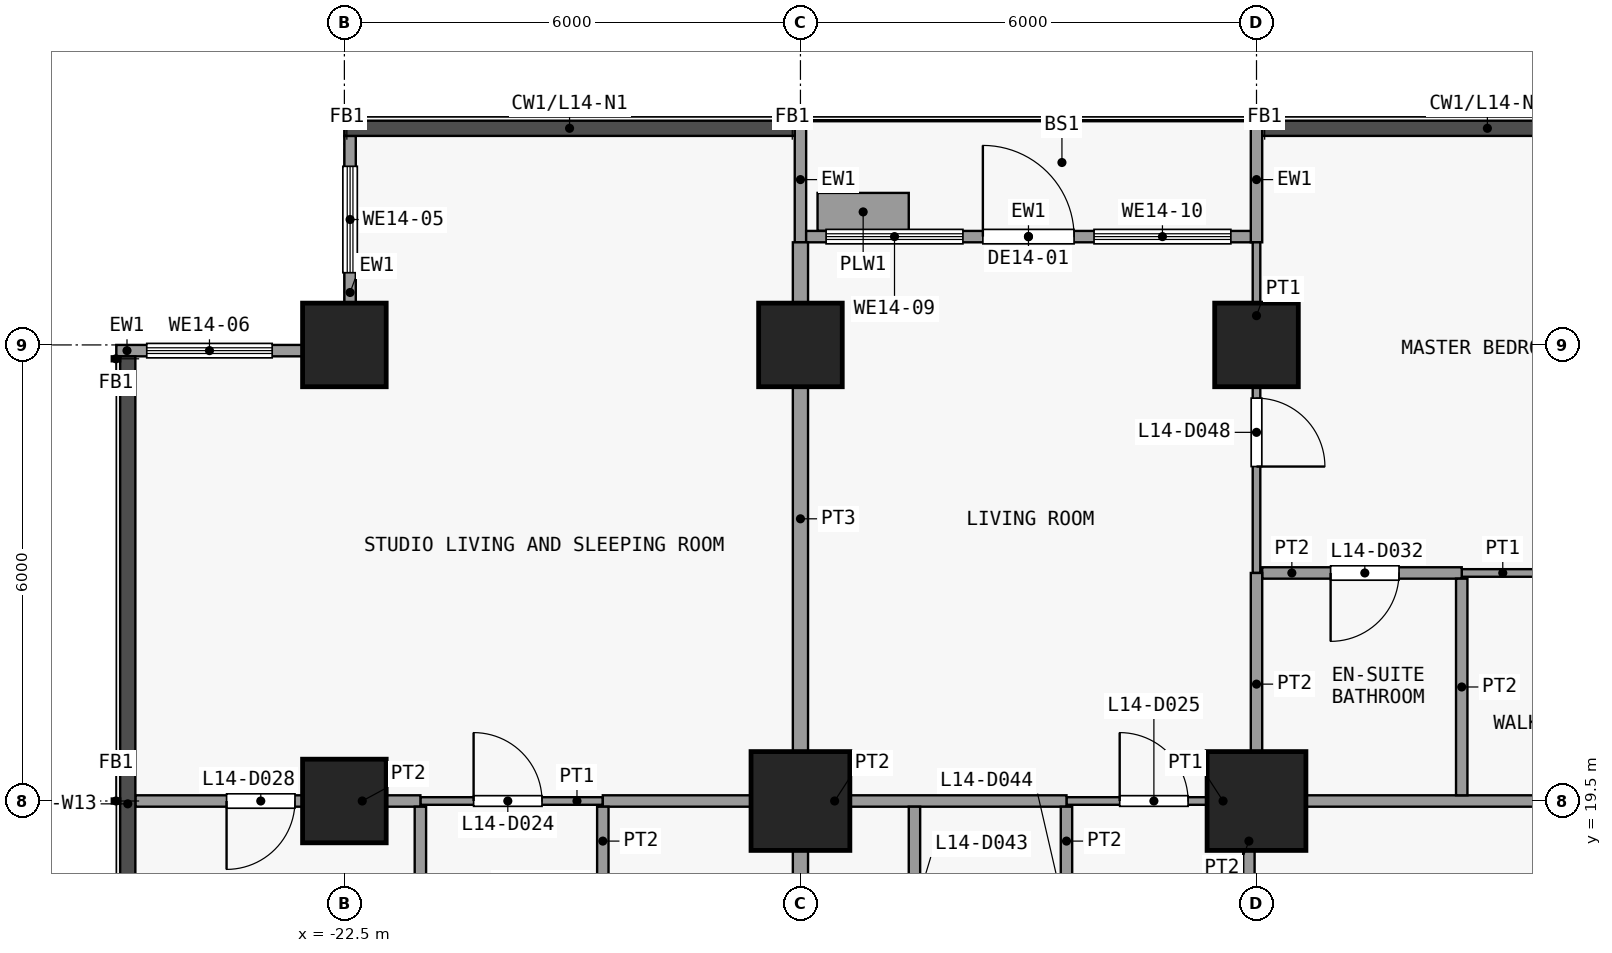
"""IFC4 building model, lengths in metres.
Left out: names, types, materials, properties, quantities, classifications, styles, units other than length and angle.
Written with IfcOpenShell. Run it as: python <this file> out.ifc"""

import sys

from ifc_helpers import new_model, si_unit, direction, frame, frame_2d, origin, origin_2d, place, context, subcontext, project, spatial, rectangle, extrude, element, fill, save


model = new_model("IFC4")
c1 = context("Model", 3, precision=1e-05, world=origin(), true_north=direction((0.0, 1.0)))
c2 = subcontext(c1, "Body", "Model", "MODEL_VIEW")
j1 = project(units=[si_unit("LENGTHUNIT", "METRE"), si_unit("PLANEANGLEUNIT", "RADIAN")], contexts=[c1])
p1 = place(None, origin())
s1 = spatial("IfcSite", under=j1, at=p1, CompositionType="ELEMENT")
p2 = place(p1, origin())
s2 = spatial("IfcBuilding", under=s1, at=p2, CompositionType="ELEMENT")
p3 = place(p2, frame((0.0, 0.0, 61.3)))
s3 = spatial("IfcBuildingStorey", under=s2, at=p3, CompositionType="ELEMENT", Elevation=61.3)
for number, where, z_axis, x_axis in (
    (1, (-22.5, 19.5, 0.0), (0.0, 0.0, 1.0), (1.0, 0.0, 0.0)),
    (2, (-22.5, 25.5, 0.0), (0.0, 0.0, 1.0), (1.0, 0.0, 0.0)),
):
    element("IfcColumn", number, at=place(p3, frame(where, z_axis=z_axis, x_axis=x_axis)), inside=s3, PredefinedType="COLUMN", context=c2, shape_type="SweptSolid", body=[
        extrude(rectangle(XDim=1.1, YDim=1.1, at=origin_2d()), origin(), (0.0, 0.0, 1.0), 3.6),
    ])
p4 = place(p3, frame((-16.5, 19.5, 0.0), z_axis=(0.0, 0.0, 1.0), x_axis=(1.0, 0.0, 0.0)))
e3 = element("IfcColumn", 3, at=p4, inside=s3, PredefinedType="COLUMN", context=c2, shape_type="SweptSolid", body=[
    extrude(rectangle(XDim=1.3, YDim=1.3, at=origin_2d()), origin(), (0.0, 0.0, 1.0), 3.6),
])
p5 = place(p3, frame((-16.5, 25.5, 0.0), z_axis=(0.0, 0.0, 1.0), x_axis=(1.0, 0.0, 0.0)))
e4 = element("IfcColumn", 4, at=p5, inside=s3, PredefinedType="COLUMN", context=c2, shape_type="SweptSolid", body=[
    extrude(rectangle(XDim=1.1, YDim=1.1, at=origin_2d()), origin(), (0.0, 0.0, 1.0), 3.6),
])
p6 = place(p3, frame((-10.5, 19.5, 0.0), z_axis=(0.0, 0.0, 1.0), x_axis=(1.0, 0.0, 0.0)))
e5 = element("IfcColumn", 5, at=p6, inside=s3, PredefinedType="COLUMN", context=c2, shape_type="SweptSolid", body=[
    extrude(rectangle(XDim=1.3, YDim=1.3, at=origin_2d()), origin(), (0.0, 0.0, 1.0), 3.6),
])
p7 = place(p3, frame((-10.5, 25.5, 0.0), z_axis=(0.0, 0.0, 1.0), x_axis=(1.0, 0.0, 0.0)))
e6 = element("IfcColumn", 6, at=p7, inside=s3, PredefinedType="COLUMN", context=c2, shape_type="SweptSolid", body=[
    extrude(rectangle(XDim=1.1, YDim=1.1, at=origin_2d()), origin(), (0.0, 0.0, 1.0), 3.6),
])
p8 = place(p3, frame((-22.425, 26.05, 0.0), z_axis=(0.0, 0.0, 1.0), x_axis=(0.0, 1.0, 0.0)))
e7 = element("IfcWall", 7, at=p8, inside=s3, PredefinedType="SOLIDWALL", context=c2, shape_type="SweptSolid", body=[
    extrude(rectangle(XDim=2.2, YDim=0.15, at=frame_2d((1.1, 0.0))), origin(), (0.0, 0.0, 1.0), 3.3),
])
p9 = place(p8, frame((0.4, 0.0, 0.9)))
e8 = element("IfcOpeningElement", 8, at=p9, cuts=e7, PredefinedType="OPENING", context=c2, shape_type="SweptSolid", body=[
    extrude(rectangle(XDim=1.4, YDim=2.4, at=frame_2d((0.7, 1.2))), frame((0.0, 0.085, 0.0), z_axis=(0.0, -1.0, 0.0), x_axis=(1.0, 0.0, 0.0)), (0.0, 0.0, 1.0), 0.17),
])
p10 = place(p3, frame((-25.5, 25.425, 0.0), z_axis=(0.0, 0.0, 1.0), x_axis=(1.0, 0.0, 0.0)))
e9 = element("IfcWall", 9, at=p10, inside=s3, PredefinedType="SOLIDWALL", context=c2, shape_type="SweptSolid", body=[
    extrude(rectangle(XDim=2.45, YDim=0.15, at=frame_2d((1.225, 0.0))), origin(), (0.0, 0.0, 1.0), 3.3),
])
p11 = place(p10, frame((0.4, 0.0, 0.9)))
e10 = element("IfcOpeningElement", 10, at=p11, cuts=e9, PredefinedType="OPENING", context=c2, shape_type="SweptSolid", body=[
    extrude(rectangle(XDim=1.65, YDim=2.4, at=frame_2d((0.825, 1.2))), frame((0.0, 0.085, 0.0), z_axis=(0.0, -1.0, 0.0), x_axis=(1.0, 0.0, 0.0)), (0.0, 0.0, 1.0), 0.17),
])
for number, where, z_axis, x_axis in (
    (11, (-16.5, 26.85, 0.0), (0.0, 0.0, 1.0), (0.0, 1.0, 0.0)),
    (12, (-10.5, 26.85, 0.0), (0.0, 0.0, 1.0), (0.0, 1.0, 0.0)),
):
    element("IfcWall", number, at=place(p3, frame(where, z_axis=z_axis, x_axis=x_axis)), inside=s3, PredefinedType="SOLIDWALL", context=c2, shape_type="SweptSolid", body=[
        extrude(rectangle(XDim=1.65, YDim=0.15, at=frame_2d((0.825, 0.0))), origin(), (0.0, 0.0, 1.0), 3.3),
    ])
p12 = place(p3, frame((-16.425, 26.925, 0.0), z_axis=(0.0, 0.0, 1.0), x_axis=(1.0, 0.0, 0.0)))
e13 = element("IfcWall", 13, at=p12, inside=s3, PredefinedType="SOLIDWALL", context=c2, shape_type="SweptSolid", body=[
    extrude(rectangle(XDim=5.85, YDim=0.15, at=frame_2d((2.925, 0.0))), origin(), (0.0, 0.0, 1.0), 3.3),
])
p13 = place(p12, frame((2.325, 0.0, 0.0)))
e14 = element("IfcOpeningElement", 14, at=p13, cuts=e13, PredefinedType="OPENING", context=c2, shape_type="SweptSolid", body=[
    extrude(rectangle(XDim=1.2, YDim=2.4, at=frame_2d((0.6, 1.2))), frame((0.0, 0.085, 0.0), z_axis=(0.0, -1.0, 0.0), x_axis=(1.0, 0.0, 0.0)), (0.0, 0.0, 1.0), 0.17),
])
p14 = place(p12, frame((0.262, 0.0, 0.9)))
e15 = element("IfcOpeningElement", 15, at=p14, cuts=e13, PredefinedType="OPENING", context=c2, shape_type="SweptSolid", body=[
    extrude(rectangle(XDim=1.8, YDim=2.1, at=frame_2d((0.9, 1.05))), frame((0.0, 0.085, 0.0), z_axis=(0.0, -1.0, 0.0), x_axis=(1.0, 0.0, 0.0)), (0.0, 0.0, 1.0), 0.17),
])
p15 = place(p12, frame((3.788, 0.0, 0.9)))
e16 = element("IfcOpeningElement", 16, at=p15, cuts=e13, PredefinedType="OPENING", context=c2, shape_type="SweptSolid", body=[
    extrude(rectangle(XDim=1.8, YDim=2.1, at=frame_2d((0.9, 1.05))), frame((0.0, 0.085, 0.0), z_axis=(0.0, -1.0, 0.0), x_axis=(1.0, 0.0, 0.0)), (0.0, 0.0, 1.0), 0.17),
])
p16 = place(p3, frame((-16.275, 27.25, 0.0), z_axis=(0.0, 0.0, 1.0), x_axis=(1.0, 0.0, 0.0)))
e17 = element("IfcWall", 17, at=p16, inside=s3, PredefinedType="USERDEFINED", context=c2, shape_type="SweptSolid", body=[
    extrude(rectangle(XDim=1.2, YDim=0.5, at=frame_2d((0.6, 0.0))), origin(), (0.0, 0.0, 1.0), 0.9),
])
p17 = place(p3, frame((-21.5, 19.5, 0.0), z_axis=(0.0, 0.0, 1.0), x_axis=(1.0, 0.0, 0.0)))
e18 = element("IfcWall", 18, at=p17, inside=s3, PredefinedType="PARTITIONING", context=c2, shape_type="SweptSolid", body=[
    extrude(rectangle(XDim=2.4, YDim=0.1, at=frame_2d((1.2, 0.0))), origin(), (0.0, 0.0, 1.0), 3.3),
])
p18 = place(p17, frame((0.7, 0.0, 0.0)))
e19 = element("IfcOpeningElement", 19, at=p18, cuts=e18, PredefinedType="OPENING", context=c2, shape_type="SweptSolid", body=[
    extrude(rectangle(XDim=0.9, YDim=2.1, at=frame_2d((0.45, 1.05))), frame((0.0, 0.06, 0.0), z_axis=(0.0, -1.0, 0.0), x_axis=(1.0, 0.0, 0.0)), (0.0, 0.0, 1.0), 0.12),
])
p19 = place(p3, frame((-13.0, 19.5, 0.0), z_axis=(0.0, 0.0, 1.0), x_axis=(1.0, 0.0, 0.0)))
e20 = element("IfcWall", 20, at=p19, inside=s3, PredefinedType="PARTITIONING", context=c2, shape_type="SweptSolid", body=[
    extrude(rectangle(XDim=2.4, YDim=0.1, at=frame_2d((1.2, 0.0))), origin(), (0.0, 0.0, 1.0), 3.3),
])
p20 = place(p19, frame((0.7, 0.0, 0.0)))
e21 = element("IfcOpeningElement", 21, at=p20, cuts=e20, PredefinedType="OPENING", context=c2, shape_type="SweptSolid", body=[
    extrude(rectangle(XDim=0.9, YDim=2.1, at=frame_2d((0.45, 1.05))), frame((0.0, 0.06, 0.0), z_axis=(0.0, -1.0, 0.0), x_axis=(1.0, 0.0, 0.0)), (0.0, 0.0, 1.0), 0.12),
])
p21 = place(p3, frame((-25.25, 19.5, 0.0), z_axis=(0.0, 0.0, 1.0), x_axis=(1.0, 0.0, 0.0)))
e22 = element("IfcWall", 22, at=p21, inside=s3, PredefinedType="PARTITIONING", context=c2, shape_type="SweptSolid", body=[
    extrude(rectangle(XDim=3.75, YDim=0.15, at=frame_2d((1.875, 0.0))), origin(), (0.0, 0.0, 1.0), 3.3),
])
p22 = place(p21, frame((1.2, 0.0, 0.0)))
e23 = element("IfcOpeningElement", 23, at=p22, cuts=e22, PredefinedType="OPENING", context=c2, shape_type="SweptSolid", body=[
    extrude(rectangle(XDim=0.9, YDim=2.1, at=frame_2d((0.45, 1.05))), frame((0.0, 0.085, 0.0), z_axis=(0.0, -1.0, 0.0), x_axis=(1.0, 0.0, 0.0)), (0.0, 0.0, 1.0), 0.17),
])
p23 = place(p3, frame((-19.1, 19.5, 0.0), z_axis=(0.0, 0.0, 1.0), x_axis=(1.0, 0.0, 0.0)))
e24 = element("IfcWall", 24, at=p23, inside=s3, PredefinedType="PARTITIONING", context=c2, shape_type="SweptSolid", body=[
    extrude(rectangle(XDim=6.1, YDim=0.15, at=frame_2d((3.05, 0.0))), origin(), (0.0, 0.0, 1.0), 3.3),
])
p24 = place(p3, frame((-10.5, 19.5, 0.0), z_axis=(0.0, 0.0, 1.0), x_axis=(1.0, 0.0, 0.0)))
e25 = element("IfcWall", 25, at=p24, inside=s3, PredefinedType="PARTITIONING", context=c2, shape_type="SweptSolid", body=[
    extrude(rectangle(XDim=8.5, YDim=0.15, at=frame_2d((4.25, 0.0))), origin(), (0.0, 0.0, 1.0), 3.3),
])
p25 = place(p3, frame((-7.8, 22.5, 0.0), z_axis=(0.0, 0.0, 1.0), x_axis=(1.0, 0.0, 0.0)))
e26 = element("IfcWall", 26, at=p25, inside=s3, PredefinedType="PARTITIONING", context=c2, shape_type="SweptSolid", body=[
    extrude(rectangle(XDim=3.2, YDim=0.1, at=frame_2d((1.6, 0.0))), origin(), (0.0, 0.0, 1.0), 3.3),
])
p26 = place(p25, frame((1.2, 0.0, 0.0)))
e27 = element("IfcOpeningElement", 27, at=p26, cuts=e26, PredefinedType="OPENING", context=c2, shape_type="SweptSolid", body=[
    extrude(rectangle(XDim=0.9, YDim=2.1, at=frame_2d((0.45, 1.05))), frame((0.0, 0.06, 0.0), z_axis=(0.0, -1.0, 0.0), x_axis=(1.0, 0.0, 0.0)), (0.0, 0.0, 1.0), 0.12),
])
p27 = place(p3, frame((-10.425, 22.5, 0.0), z_axis=(0.0, 0.0, 1.0), x_axis=(1.0, 0.0, 0.0)))
e28 = element("IfcWall", 28, at=p27, inside=s3, PredefinedType="PARTITIONING", context=c2, shape_type="SweptSolid", body=[
    extrude(rectangle(XDim=2.625, YDim=0.15, at=frame_2d((1.312, 0.0))), origin(), (0.0, 0.0, 1.0), 3.3),
])
p28 = place(p27, frame((0.9, 0.0, 0.0)))
e29 = element("IfcOpeningElement", 29, at=p28, cuts=e28, PredefinedType="OPENING", context=c2, shape_type="SweptSolid", body=[
    extrude(rectangle(XDim=0.9, YDim=2.1, at=frame_2d((0.45, 1.05))), frame((0.0, 0.085, 0.0), z_axis=(0.0, -1.0, 0.0), x_axis=(1.0, 0.0, 0.0)), (0.0, 0.0, 1.0), 0.17),
])
p29 = place(p3, frame((-21.5, 16.6, 0.0), z_axis=(0.0, 0.0, 1.0), x_axis=(0.0, 1.0, 0.0)))
e30 = element("IfcWall", 30, at=p29, inside=s3, PredefinedType="PARTITIONING", context=c2, shape_type="SweptSolid", body=[
    extrude(rectangle(XDim=2.825, YDim=0.15, at=frame_2d((1.413, 0.0))), origin(), (0.0, 0.0, 1.0), 3.3),
])
p30 = place(p3, frame((-19.1, 16.6, 0.0), z_axis=(0.0, 0.0, 1.0), x_axis=(0.0, 1.0, 0.0)))
e31 = element("IfcWall", 31, at=p30, inside=s3, PredefinedType="PARTITIONING", context=c2, shape_type="SweptSolid", body=[
    extrude(rectangle(XDim=2.825, YDim=0.15, at=frame_2d((1.413, 0.0))), origin(), (0.0, 0.0, 1.0), 3.3),
])
p31 = place(p30, frame((0.9, 0.0, 0.0)))
e32 = element("IfcOpeningElement", 32, at=p31, cuts=e31, PredefinedType="OPENING", context=c2, shape_type="SweptSolid", body=[
    extrude(rectangle(XDim=0.9, YDim=2.1, at=frame_2d((0.45, 1.05))), frame((0.0, 0.085, 0.0), z_axis=(0.0, -1.0, 0.0), x_axis=(1.0, 0.0, 0.0)), (0.0, 0.0, 1.0), 0.17),
])
p32 = place(p3, frame((-16.5, 16.6, 0.0), z_axis=(0.0, 0.0, 1.0), x_axis=(0.0, 1.0, 0.0)))
e33 = element("IfcWall", 33, at=p32, inside=s3, PredefinedType="PARTITIONING", context=c2, shape_type="SweptSolid", body=[
    extrude(rectangle(XDim=2.825, YDim=0.2, at=frame_2d((1.413, 0.0))), origin(), (0.0, 0.0, 1.0), 3.3),
])
p33 = place(p3, frame((-16.5, 19.575, 0.0), z_axis=(0.0, 0.0, 1.0), x_axis=(0.0, 1.0, 0.0)))
e34 = element("IfcWall", 34, at=p33, inside=s3, PredefinedType="PARTITIONING", context=c2, shape_type="SweptSolid", body=[
    extrude(rectangle(XDim=7.275, YDim=0.2, at=frame_2d((3.638, 0.0))), origin(), (0.0, 0.0, 1.0), 3.3),
])
p34 = place(p3, frame((-15.0, 16.6, 0.0), z_axis=(0.0, 0.0, 1.0), x_axis=(0.0, 1.0, 0.0)))
e35 = element("IfcWall", 35, at=p34, inside=s3, PredefinedType="PARTITIONING", context=c2, shape_type="SweptSolid", body=[
    extrude(rectangle(XDim=2.825, YDim=0.15, at=frame_2d((1.413, 0.0))), origin(), (0.0, 0.0, 1.0), 3.3),
])
p35 = place(p34, frame((1.0, 0.0, 0.0)))
e36 = element("IfcOpeningElement", 36, at=p35, cuts=e35, PredefinedType="OPENING", context=c2, shape_type="SweptSolid", body=[
    extrude(rectangle(XDim=0.9, YDim=2.1, at=frame_2d((0.45, 1.05))), frame((0.0, 0.085, 0.0), z_axis=(0.0, -1.0, 0.0), x_axis=(1.0, 0.0, 0.0)), (0.0, 0.0, 1.0), 0.17),
])
p36 = place(p3, frame((-13.0, 16.6, 0.0), z_axis=(0.0, 0.0, 1.0), x_axis=(0.0, 1.0, 0.0)))
e37 = element("IfcWall", 37, at=p36, inside=s3, PredefinedType="PARTITIONING", context=c2, shape_type="SweptSolid", body=[
    extrude(rectangle(XDim=2.825, YDim=0.15, at=frame_2d((1.413, 0.0))), origin(), (0.0, 0.0, 1.0), 3.3),
])
p37 = place(p36, frame((0.9, 0.0, 0.0)))
e38 = element("IfcOpeningElement", 38, at=p37, cuts=e37, PredefinedType="OPENING", context=c2, shape_type="SweptSolid", body=[
    extrude(rectangle(XDim=0.9, YDim=2.1, at=frame_2d((0.45, 1.05))), frame((0.0, 0.085, 0.0), z_axis=(0.0, -1.0, 0.0), x_axis=(1.0, 0.0, 0.0)), (0.0, 0.0, 1.0), 0.17),
])
p38 = place(p3, frame((-10.6, 16.6, 0.0), z_axis=(0.0, 0.0, 1.0), x_axis=(0.0, 1.0, 0.0)))
e39 = element("IfcWall", 39, at=p38, inside=s3, PredefinedType="PARTITIONING", context=c2, shape_type="SweptSolid", body=[
    extrude(rectangle(XDim=2.825, YDim=0.15, at=frame_2d((1.413, 0.0))), origin(), (0.0, 0.0, 1.0), 3.3),
])
p39 = place(p38, frame((0.9, 0.0, 0.0)))
e40 = element("IfcOpeningElement", 40, at=p39, cuts=e39, PredefinedType="OPENING", context=c2, shape_type="SweptSolid", body=[
    extrude(rectangle(XDim=0.9, YDim=2.1, at=frame_2d((0.45, 1.05))), frame((0.0, 0.085, 0.0), z_axis=(0.0, -1.0, 0.0), x_axis=(1.0, 0.0, 0.0)), (0.0, 0.0, 1.0), 0.17),
])
p40 = place(p3, frame((-10.5, 22.5, 0.0), z_axis=(0.0, 0.0, 1.0), x_axis=(0.0, 1.0, 0.0)))
e41 = element("IfcWall", 41, at=p40, inside=s3, PredefinedType="PARTITIONING", context=c2, shape_type="SweptSolid", body=[
    extrude(rectangle(XDim=4.35, YDim=0.1, at=frame_2d((2.175, 0.0))), origin(), (0.0, 0.0, 1.0), 3.3),
])
p41 = place(p40, frame((1.4, 0.0, 0.0)))
e42 = element("IfcOpeningElement", 42, at=p41, cuts=e41, PredefinedType="OPENING", context=c2, shape_type="SweptSolid", body=[
    extrude(rectangle(XDim=0.9, YDim=2.1, at=frame_2d((0.45, 1.05))), frame((0.0, 0.06, 0.0), z_axis=(0.0, -1.0, 0.0), x_axis=(1.0, 0.0, 0.0)), (0.0, 0.0, 1.0), 0.12),
])
p42 = place(p3, frame((-10.5, 19.575, 0.0), z_axis=(0.0, 0.0, 1.0), x_axis=(0.0, 1.0, 0.0)))
e43 = element("IfcWall", 43, at=p42, inside=s3, PredefinedType="PARTITIONING", context=c2, shape_type="SweptSolid", body=[
    extrude(rectangle(XDim=2.925, YDim=0.15, at=frame_2d((1.462, 0.0))), origin(), (0.0, 0.0, 1.0), 3.3),
])
p43 = place(p3, frame((-7.8, 19.575, 0.0), z_axis=(0.0, 0.0, 1.0), x_axis=(0.0, 1.0, 0.0)))
e44 = element("IfcWall", 44, at=p43, inside=s3, PredefinedType="PARTITIONING", context=c2, shape_type="SweptSolid", body=[
    extrude(rectangle(XDim=2.85, YDim=0.15, at=frame_2d((1.425, 0.0))), origin(), (0.0, 0.0, 1.0), 3.3),
])
p44 = place(p9, origin())
e45 = element("IfcWindow", 45, at=p44, inside=s3, PartitioningType="SINGLE_PANEL", PredefinedType="WINDOW", context=c2, shape_type="SweptSolid", body=[
    extrude(rectangle(XDim=1.4, YDim=2.4, at=frame_2d((0.7, 1.2))), frame((0.0, 0.03, 0.0), z_axis=(0.0, -1.0, 0.0), x_axis=(1.0, 0.0, 0.0)), (0.0, 0.0, 1.0), 0.06),
])
fill(e8, e45)
p45 = place(p11, origin())
e46 = element("IfcWindow", 46, at=p45, inside=s3, PartitioningType="SINGLE_PANEL", PredefinedType="WINDOW", context=c2, shape_type="SweptSolid", body=[
    extrude(rectangle(XDim=1.65, YDim=2.4, at=frame_2d((0.825, 1.2))), frame((0.0, 0.03, 0.0), z_axis=(0.0, -1.0, 0.0), x_axis=(1.0, 0.0, 0.0)), (0.0, 0.0, 1.0), 0.06),
])
fill(e10, e46)
p46 = place(p13, origin())
e47 = element("IfcDoor", 47, at=p46, inside=s3, OperationType="SINGLE_SWING_LEFT", PredefinedType="DOOR", context=c2, shape_type="SweptSolid", body=[
    extrude(rectangle(XDim=1.2, YDim=2.4, at=frame_2d((0.6, 1.2))), frame((0.0, 0.025, 0.0), z_axis=(0.0, -1.0, 0.0), x_axis=(1.0, 0.0, 0.0)), (0.0, 0.0, 1.0), 0.05),
])
fill(e14, e47)
p47 = place(p14, origin())
e48 = element("IfcWindow", 48, at=p47, inside=s3, PartitioningType="SINGLE_PANEL", PredefinedType="WINDOW", context=c2, shape_type="SweptSolid", body=[
    extrude(rectangle(XDim=1.8, YDim=2.1, at=frame_2d((0.9, 1.05))), frame((0.0, 0.03, 0.0), z_axis=(0.0, -1.0, 0.0), x_axis=(1.0, 0.0, 0.0)), (0.0, 0.0, 1.0), 0.06),
])
fill(e15, e48)
p48 = place(p15, origin())
e49 = element("IfcWindow", 49, at=p48, inside=s3, PartitioningType="SINGLE_PANEL", PredefinedType="WINDOW", context=c2, shape_type="SweptSolid", body=[
    extrude(rectangle(XDim=1.8, YDim=2.1, at=frame_2d((0.9, 1.05))), frame((0.0, 0.03, 0.0), z_axis=(0.0, -1.0, 0.0), x_axis=(1.0, 0.0, 0.0)), (0.0, 0.0, 1.0), 0.06),
])
fill(e16, e49)
p49 = place(p18, origin())
e50 = element("IfcDoor", 50, at=p49, inside=s3, OperationType="SINGLE_SWING_RIGHT", PredefinedType="DOOR", context=c2, shape_type="SweptSolid", body=[
    extrude(rectangle(XDim=0.9, YDim=2.1, at=frame_2d((0.45, 1.05))), frame((0.0, 0.025, 0.0), z_axis=(0.0, -1.0, 0.0), x_axis=(1.0, 0.0, 0.0)), (0.0, 0.0, 1.0), 0.05),
])
fill(e19, e50)
p50 = place(p20, origin())
e51 = element("IfcDoor", 51, at=p50, inside=s3, OperationType="SINGLE_SWING_RIGHT", PredefinedType="DOOR", context=c2, shape_type="SweptSolid", body=[
    extrude(rectangle(XDim=0.9, YDim=2.1, at=frame_2d((0.45, 1.05))), frame((0.0, 0.025, 0.0), z_axis=(0.0, -1.0, 0.0), x_axis=(1.0, 0.0, 0.0)), (0.0, 0.0, 1.0), 0.05),
])
fill(e21, e51)
p51 = place(p22, origin())
e52 = element("IfcDoor", 52, at=p51, inside=s3, OperationType="SINGLE_SWING_LEFT", PredefinedType="DOOR", context=c2, shape_type="SweptSolid", body=[
    extrude(rectangle(XDim=0.9, YDim=2.1, at=frame_2d((0.45, 1.05))), frame((0.0, 0.025, 0.0), z_axis=(0.0, -1.0, 0.0), x_axis=(1.0, 0.0, 0.0)), (0.0, 0.0, 1.0), 0.05),
])
fill(e23, e52)
p52 = place(p28, origin())
e53 = element("IfcDoor", 53, at=p52, inside=s3, OperationType="SINGLE_SWING_LEFT", PredefinedType="DOOR", context=c2, shape_type="SweptSolid", body=[
    extrude(rectangle(XDim=0.9, YDim=2.1, at=frame_2d((0.45, 1.05))), frame((0.0, 0.025, 0.0), z_axis=(0.0, -1.0, 0.0), x_axis=(1.0, 0.0, 0.0)), (0.0, 0.0, 1.0), 0.05),
])
fill(e29, e53)
p53 = place(p41, origin())
e54 = element("IfcDoor", 54, at=p53, inside=s3, OperationType="SINGLE_SWING_LEFT", PredefinedType="DOOR", context=c2, shape_type="SweptSolid", body=[
    extrude(rectangle(XDim=0.9, YDim=2.1, at=frame_2d((0.45, 1.05))), frame((0.0, 0.025, 0.0), z_axis=(0.0, -1.0, 0.0), x_axis=(1.0, 0.0, 0.0)), (0.0, 0.0, 1.0), 0.05),
])
fill(e42, e54)
save(model, sys.argv[1])
